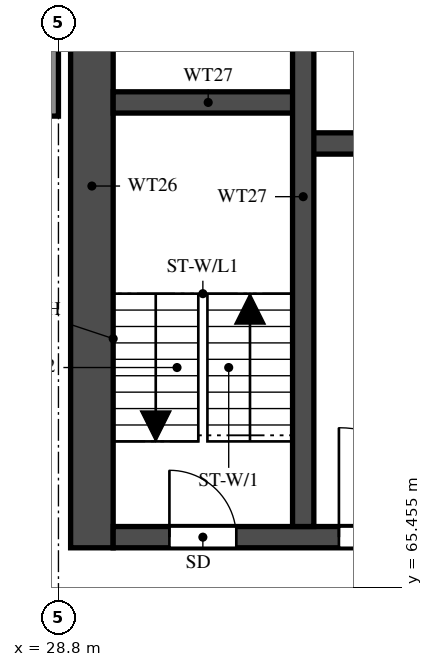
"""IFC4 building model, lengths in metres.
Left out: names, types, materials, properties, quantities, classifications, styles, units other than length and angle.
Written with IfcOpenShell. Run it as: python <this file> out.ifc"""

import sys

from ifc_helpers import new_model, si_unit, direction, frame, frame_2d, origin, place, context, subcontext, project, spatial, rectangle, extrude, element, fill, save


model = new_model("IFC4")
c1 = context("Model", 3, precision=1e-05, world=origin(), true_north=direction((0.0, 1.0)))
c2 = subcontext(c1, "Body", "Model", "MODEL_VIEW")
j1 = project(units=[si_unit("LENGTHUNIT", "METRE"), si_unit("PLANEANGLEUNIT", "RADIAN")], contexts=[c1])
p1 = place(None, origin())
s1 = spatial("IfcSite", under=j1, at=p1, CompositionType="ELEMENT")
p2 = place(p1, origin())
s2 = spatial("IfcBuilding", under=s1, at=p2, CompositionType="ELEMENT")
p3 = place(p2, frame((0.0, 0.0, 113.0)))
s3 = spatial("IfcBuildingStorey", under=s2, at=p3, CompositionType="ELEMENT", Elevation=113.0)
p4 = place(p3, frame((29.35, 66.1, 0.0), z_axis=(0.0, 0.0, 1.0), x_axis=(0.0, 1.0, 0.0)))
e1 = element("IfcWall", 1, at=p4, inside=s3, PredefinedType="SHEAR", context=c2, shape_type="SweptSolid", body=[
    extrude(rectangle(XDim=11.9, YDim=0.7, at=frame_2d((5.95, 0.0))), origin(), (0.0, 0.0, 1.0), 3.2),
])
p5 = place(p3, frame((29.7, 66.275, 0.0), z_axis=(0.0, 0.0, 1.0), x_axis=(1.0, 0.0, 0.0)))
e2 = element("IfcWall", 2, at=p5, inside=s3, PredefinedType="SHEAR", context=c2, shape_type="SweptSolid", body=[
    extrude(rectangle(XDim=41.4, YDim=0.35, at=frame_2d((20.7, 0.0))), origin(), (0.0, 0.0, 1.0), 3.2),
])
p6 = place(p5, frame((0.925, 0.0, 0.0)))
e3 = element("IfcOpeningElement", 3, at=p6, cuts=e2, PredefinedType="OPENING", context=c2, shape_type="SweptSolid", body=[
    extrude(rectangle(XDim=1.1, YDim=2.1, at=frame_2d((0.55, 1.05))), frame((0.0, 0.185, 0.0), z_axis=(0.0, -1.0, 0.0), x_axis=(1.0, 0.0, 0.0)), (0.0, 0.0, 1.0), 0.37),
])
p7 = place(p5, frame((3.712, 0.0, 0.0)))
e4 = element("IfcOpeningElement", 4, at=p7, cuts=e2, PredefinedType="OPENING", context=c2, shape_type="SweptSolid", body=[
    extrude(rectangle(XDim=1.8, YDim=2.1, at=frame_2d((0.9, 1.05))), frame((0.0, 0.185, 0.0), z_axis=(0.0, -1.0, 0.0), x_axis=(1.0, 0.0, 0.0)), (0.0, 0.0, 1.0), 0.37),
])
p8 = place(p3, frame((32.825, 72.75, 0.0), z_axis=(0.0, 0.0, 1.0), x_axis=(1.0, 0.0, 0.0)))
e5 = element("IfcWall", 5, at=p8, inside=s3, PredefinedType="SHEAR", context=c2, shape_type="SweptSolid", body=[
    extrude(rectangle(XDim=35.15, YDim=0.35, at=frame_2d((17.575, 0.0))), origin(), (0.0, 0.0, 1.0), 3.2),
])
p9 = place(p8, frame((19.8, 0.0, 0.0)))
e6 = element("IfcOpeningElement", 6, at=p9, cuts=e5, PredefinedType="OPENING", context=c2, shape_type="SweptSolid", body=[
    extrude(rectangle(XDim=1.1, YDim=2.1, at=frame_2d((0.55, 1.05))), frame((0.0, 0.185, 0.0), z_axis=(0.0, -1.0, 0.0), x_axis=(1.0, 0.0, 0.0)), (0.0, 0.0, 1.0), 0.37),
])
p10 = place(p8, frame((27.7, 0.0, 0.0)))
e7 = element("IfcOpeningElement", 7, at=p10, cuts=e5, PredefinedType="OPENING", context=c2, shape_type="SweptSolid", body=[
    extrude(rectangle(XDim=1.1, YDim=2.1, at=frame_2d((0.55, 1.05))), frame((0.0, 0.185, 0.0), z_axis=(0.0, -1.0, 0.0), x_axis=(1.0, 0.0, 0.0)), (0.0, 0.0, 1.0), 0.37),
])
p11 = place(p8, frame((30.3, 0.0, 0.0)))
e8 = element("IfcOpeningElement", 8, at=p11, cuts=e5, PredefinedType="OPENING", context=c2, shape_type="SweptSolid", body=[
    extrude(rectangle(XDim=1.1, YDim=2.1, at=frame_2d((0.55, 1.05))), frame((0.0, 0.185, 0.0), z_axis=(0.0, -1.0, 0.0), x_axis=(1.0, 0.0, 0.0)), (0.0, 0.0, 1.0), 0.37),
])
p12 = place(p8, frame((3.8, 0.0, 0.0)))
e9 = element("IfcOpeningElement", 9, at=p12, cuts=e5, PredefinedType="OPENING", context=c2, shape_type="SweptSolid", body=[
    extrude(rectangle(XDim=1.1, YDim=2.1, at=frame_2d((0.55, 1.05))), frame((0.0, 0.185, 0.0), z_axis=(0.0, -1.0, 0.0), x_axis=(1.0, 0.0, 0.0)), (0.0, 0.0, 1.0), 0.37),
])
p13 = place(p8, frame((6.55, 0.0, 0.0)))
e10 = element("IfcOpeningElement", 10, at=p13, cuts=e5, PredefinedType="OPENING", context=c2, shape_type="SweptSolid", body=[
    extrude(rectangle(XDim=1.1, YDim=2.1, at=frame_2d((0.55, 1.05))), frame((0.0, 0.185, 0.0), z_axis=(0.0, -1.0, 0.0), x_axis=(1.0, 0.0, 0.0)), (0.0, 0.0, 1.0), 0.37),
])
p14 = place(p8, frame((9.3, 0.0, 0.0)))
e11 = element("IfcOpeningElement", 11, at=p14, cuts=e5, PredefinedType="OPENING", context=c2, shape_type="SweptSolid", body=[
    extrude(rectangle(XDim=1.1, YDim=2.1, at=frame_2d((0.55, 1.05))), frame((0.0, 0.185, 0.0), z_axis=(0.0, -1.0, 0.0), x_axis=(1.0, 0.0, 0.0)), (0.0, 0.0, 1.0), 0.37),
])
p15 = place(p8, frame((12.05, 0.0, 0.0)))
e12 = element("IfcOpeningElement", 12, at=p15, cuts=e5, PredefinedType="OPENING", context=c2, shape_type="SweptSolid", body=[
    extrude(rectangle(XDim=1.1, YDim=2.1, at=frame_2d((0.55, 1.05))), frame((0.0, 0.185, 0.0), z_axis=(0.0, -1.0, 0.0), x_axis=(1.0, 0.0, 0.0)), (0.0, 0.0, 1.0), 0.37),
])
p16 = place(p8, frame((14.8, 0.0, 0.0)))
e13 = element("IfcOpeningElement", 13, at=p16, cuts=e5, PredefinedType="OPENING", context=c2, shape_type="SweptSolid", body=[
    extrude(rectangle(XDim=1.1, YDim=2.1, at=frame_2d((0.55, 1.05))), frame((0.0, 0.185, 0.0), z_axis=(0.0, -1.0, 0.0), x_axis=(1.0, 0.0, 0.0)), (0.0, 0.0, 1.0), 0.37),
])
p17 = place(p8, frame((17.55, 0.0, 0.0)))
e14 = element("IfcOpeningElement", 14, at=p17, cuts=e5, PredefinedType="OPENING", context=c2, shape_type="SweptSolid", body=[
    extrude(rectangle(XDim=1.1, YDim=2.1, at=frame_2d((0.55, 1.05))), frame((0.0, 0.185, 0.0), z_axis=(0.0, -1.0, 0.0), x_axis=(1.0, 0.0, 0.0)), (0.0, 0.0, 1.0), 0.37),
])
p18 = place(p8, frame((0.938, 0.0, 0.0)))
e15 = element("IfcOpeningElement", 15, at=p18, cuts=e5, PredefinedType="OPENING", context=c2, shape_type="SweptSolid", body=[
    extrude(rectangle(XDim=1.1, YDim=2.1, at=frame_2d((0.55, 1.05))), frame((0.0, 0.185, 0.0), z_axis=(0.0, -1.0, 0.0), x_axis=(1.0, 0.0, 0.0)), (0.0, 0.0, 1.0), 0.37),
])
p19 = place(p3, frame((29.7, 73.425, 0.0), z_axis=(0.0, 0.0, 1.0), x_axis=(1.0, 0.0, 0.0)))
e16 = element("IfcWall", 16, at=p19, inside=s3, PredefinedType="SHEAR", context=c2, shape_type="SweptSolid", body=[
    extrude(rectangle(XDim=3.125, YDim=0.35, at=frame_2d((1.562, 0.0))), origin(), (0.0, 0.0, 1.0), 3.2),
])
p20 = place(p3, frame((32.825, 66.45, 0.0), z_axis=(0.0, 0.0, 1.0), x_axis=(0.0, 1.0, 0.0)))
e17 = element("IfcWall", 17, at=p20, inside=s3, PredefinedType="SHEAR", context=c2, shape_type="SweptSolid", body=[
    extrude(rectangle(XDim=10.85, YDim=0.35, at=frame_2d((5.425, 0.0))), origin(), (0.0, 0.0, 1.0), 3.2),
])
p21 = place(p3, frame((28.7, 73.2, 0.0), z_axis=(0.0, 0.0, 1.0), x_axis=(0.0, 1.0, 0.0)))
e18 = element("IfcWall", 18, at=p21, inside=s3, PredefinedType="SOLIDWALL", context=c2, shape_type="SweptSolid", body=[
    extrude(rectangle(XDim=4.8, YDim=0.2, at=frame_2d((2.4, 0.0))), origin(), (0.0, 0.0, 1.0), 3.2),
])
p22 = place(p6, origin())
e19 = element("IfcDoor", 19, at=p22, inside=s3, OperationType="SINGLE_SWING_LEFT", PredefinedType="DOOR", context=c2, shape_type="SweptSolid", body=[
    extrude(rectangle(XDim=1.1, YDim=2.1, at=frame_2d((0.55, 1.05))), frame((0.0, 0.025, 0.0), z_axis=(0.0, -1.0, 0.0), x_axis=(1.0, 0.0, 0.0)), (0.0, 0.0, 1.0), 0.05),
])
fill(e3, e19)
p23 = place(p7, origin())
e20 = element("IfcDoor", 20, at=p23, inside=s3, OperationType="DOUBLE_DOOR_SINGLE_SWING", PredefinedType="DOOR", context=c2, shape_type="SweptSolid", body=[
    extrude(rectangle(XDim=1.8, YDim=2.1, at=frame_2d((0.9, 1.05))), frame((0.0, 0.025, 0.0), z_axis=(0.0, -1.0, 0.0), x_axis=(1.0, 0.0, 0.0)), (0.0, 0.0, 1.0), 0.05),
])
fill(e4, e20)
save(model, sys.argv[1])
